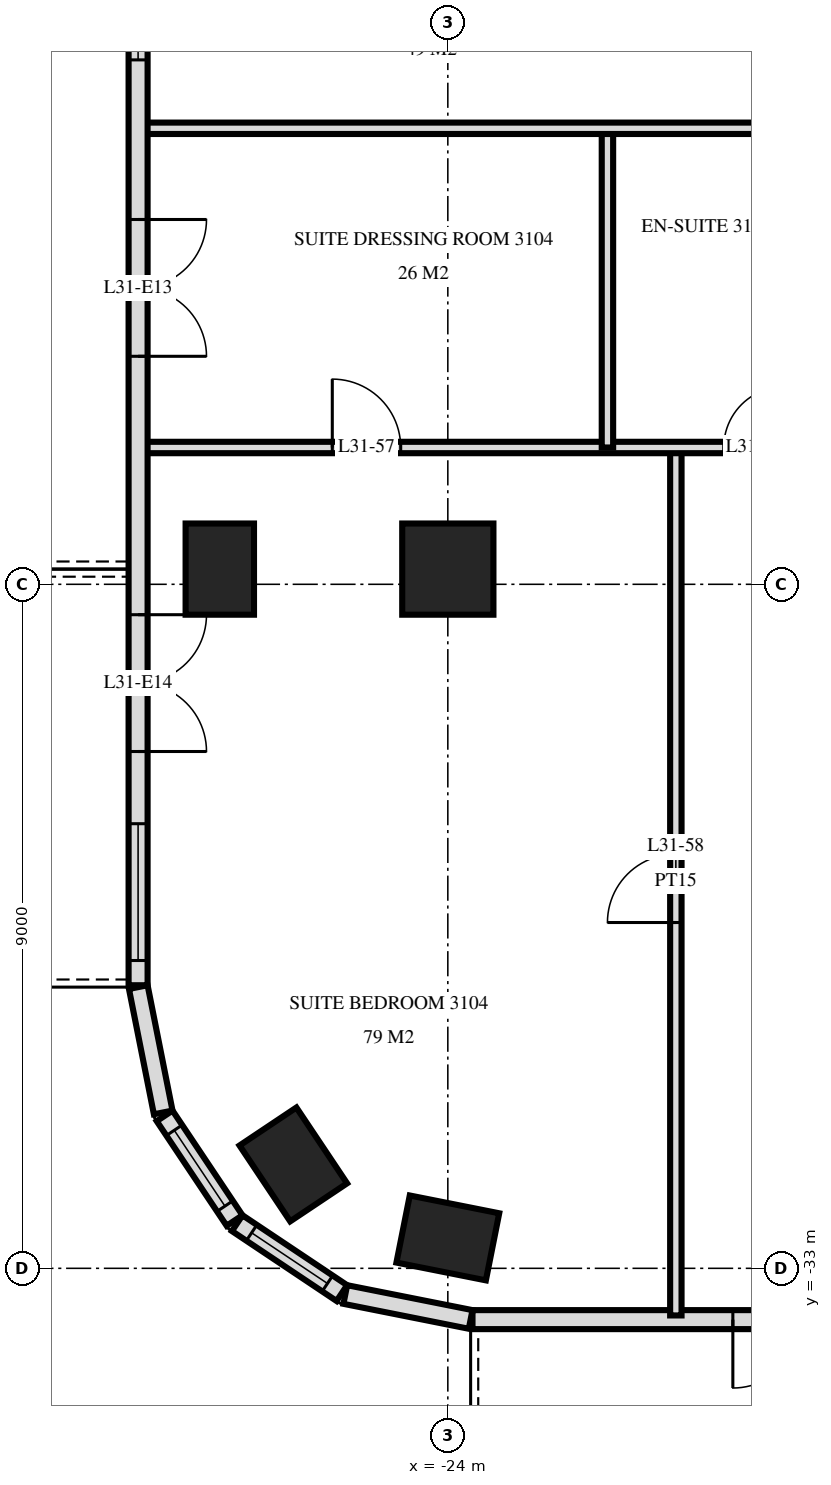
"""IFC4 building model, lengths in metres.
Left out: names, types, materials, properties, quantities, classifications, styles, units other than length and angle.
Written with IfcOpenShell. Run it as: python <this file> out.ifc"""

import sys

from ifc_helpers import new_model, si_unit, direction, frame, frame_2d, origin, origin_2d, place, context, subcontext, project, spatial, rectangle, extrude, element, fill, save


model = new_model("IFC4")
c1 = context("Model", 3, precision=1e-05, world=origin(), true_north=direction((0.0, 1.0)))
c2 = subcontext(c1, "Body", "Model", "MODEL_VIEW")
j1 = project(units=[si_unit("LENGTHUNIT", "METRE"), si_unit("PLANEANGLEUNIT", "RADIAN")], contexts=[c1])
p1 = place(None, origin())
s1 = spatial("IfcSite", under=j1, at=p1, CompositionType="ELEMENT")
p2 = place(p1, origin())
s2 = spatial("IfcBuilding", under=s1, at=p2, CompositionType="ELEMENT")
p3 = place(p2, frame((0.0, 0.0, 123.6)))
s3 = spatial("IfcBuildingStorey", under=s2, at=p3, CompositionType="ELEMENT", Elevation=123.6)
for number, where, z_axis, x_axis in (
    (1, (-27.0, -23.8, 0.0), (0.0, 0.0, 1.0), (0.0, 1.0, 0.0)),
    (2, (-26.033, -31.633, 0.0), (0.0, 0.0, 1.0), (-0.556, 0.831, 0.0)),
    (3, (-24.0, -32.6, 0.0), (0.0, 0.0, 1.0), (-0.981, 0.195, 0.0)),
):
    element("IfcColumn", number, at=place(p3, frame(where, z_axis=z_axis, x_axis=x_axis)), inside=s3, PredefinedType="COLUMN", context=c2, shape_type="SweptSolid", body=[
        extrude(rectangle(XDim=1.2, YDim=0.9, at=origin_2d()), origin(), (0.0, 0.0, 1.0), 3.6),
    ])
p4 = place(p3, frame((-24.0, -23.8, 0.0), z_axis=(0.0, 0.0, 1.0), x_axis=(1.0, 0.0, 0.0)))
e4 = element("IfcColumn", 4, at=p4, inside=s3, PredefinedType="COLUMN", context=c2, shape_type="SweptSolid", body=[
    extrude(rectangle(XDim=1.2, YDim=1.2, at=origin_2d()), origin(), (0.0, 0.0, 1.0), 3.6),
])
p5 = place(p3, frame((-28.075, -3.325, 0.0), z_axis=(0.0, 0.0, 1.0), x_axis=(0.0, -1.0, 0.0)))
e5 = element("IfcWall", 5, at=p5, inside=s3, PredefinedType="SOLIDWALL", context=c2, shape_type="SweptSolid", body=[
    extrude(rectangle(XDim=25.951, YDim=0.25, at=frame_2d((12.975, 0.0))), origin(), (0.0, 0.0, 1.0), 3.32),
])
p6 = place(p5, frame((6.575, 0.0, 0.0)))
e6 = element("IfcOpeningElement", 6, at=p6, cuts=e5, PredefinedType="OPENING", context=c2, shape_type="SweptSolid", body=[
    extrude(rectangle(XDim=1.8, YDim=2.4, at=frame_2d((0.9, 1.2))), frame((0.0, 0.135, 0.0), z_axis=(0.0, -1.0, 0.0), x_axis=(1.0, 0.0, 0.0)), (0.0, 0.0, 1.0), 0.27),
])
p7 = place(p5, frame((9.425, 0.0, 0.3)))
e7 = element("IfcOpeningElement", 7, at=p7, cuts=e5, PredefinedType="OPENING", context=c2, shape_type="SweptSolid", body=[
    extrude(rectangle(XDim=1.8, YDim=2.1, at=frame_2d((0.9, 1.05))), frame((0.0, 0.135, 0.0), z_axis=(0.0, -1.0, 0.0), x_axis=(1.0, 0.0, 0.0)), (0.0, 0.0, 1.0), 0.27),
])
p8 = place(p5, frame((12.575, 0.0, 0.3)))
e8 = element("IfcOpeningElement", 8, at=p8, cuts=e5, PredefinedType="OPENING", context=c2, shape_type="SweptSolid", body=[
    extrude(rectangle(XDim=1.2, YDim=2.1, at=frame_2d((0.6, 1.05))), frame((0.0, 0.135, 0.0), z_axis=(0.0, -1.0, 0.0), x_axis=(1.0, 0.0, 0.0)), (0.0, 0.0, 1.0), 0.27),
])
p9 = place(p5, frame((15.875, 0.0, 0.0)))
e9 = element("IfcOpeningElement", 9, at=p9, cuts=e5, PredefinedType="OPENING", context=c2, shape_type="SweptSolid", body=[
    extrude(rectangle(XDim=1.8, YDim=2.4, at=frame_2d((0.9, 1.2))), frame((0.0, 0.135, 0.0), z_axis=(0.0, -1.0, 0.0), x_axis=(1.0, 0.0, 0.0)), (0.0, 0.0, 1.0), 0.27),
])
p10 = place(p5, frame((21.075, 0.0, 0.0)))
e10 = element("IfcOpeningElement", 10, at=p10, cuts=e5, PredefinedType="OPENING", context=c2, shape_type="SweptSolid", body=[
    extrude(rectangle(XDim=1.8, YDim=2.4, at=frame_2d((0.9, 1.2))), frame((0.0, 0.135, 0.0), z_axis=(0.0, -1.0, 0.0), x_axis=(1.0, 0.0, 0.0)), (0.0, 0.0, 1.0), 0.27),
])
p11 = place(p5, frame((23.825, 0.0, 0.3)))
e11 = element("IfcOpeningElement", 11, at=p11, cuts=e5, PredefinedType="OPENING", context=c2, shape_type="SweptSolid", body=[
    extrude(rectangle(XDim=1.8, YDim=2.1, at=frame_2d((0.9, 1.05))), frame((0.0, 0.135, 0.0), z_axis=(0.0, -1.0, 0.0), x_axis=(1.0, 0.0, 0.0)), (0.0, 0.0, 1.0), 0.27),
])
p12 = place(p3, frame((-28.073, -29.3, 0.0), z_axis=(0.0, 0.0, 1.0), x_axis=(0.194999110559, -0.980803419081, 0.0)))
e12 = element("IfcWall", 12, at=p12, inside=s3, PredefinedType="SOLIDWALL", context=c2, shape_type="SweptSolid", body=[
    extrude(rectangle(XDim=1.681, YDim=0.25, at=frame_2d((0.841, 0.0))), origin(), (0.0, 0.0, 1.0), 3.32),
])
p13 = place(p3, frame((-27.726, -30.994, 0.0), z_axis=(0.0, 0.0, 1.0), x_axis=(0.55555029066, -0.831482937015, 0.0)))
e13 = element("IfcWall", 13, at=p13, inside=s3, PredefinedType="SOLIDWALL", context=c2, shape_type="SweptSolid", body=[
    extrude(rectangle(XDim=1.656, YDim=0.25, at=frame_2d((0.828, 0.0))), origin(), (0.0, 0.0, 1.0), 3.32),
])
p14 = place(p13, frame((0.228, 0.0, 0.9)))
e14 = element("IfcOpeningElement", 14, at=p14, cuts=e13, PredefinedType="OPENING", context=c2, shape_type="SweptSolid", body=[
    extrude(rectangle(XDim=1.2, YDim=1.5, at=frame_2d((0.6, 0.75))), frame((0.0, 0.135, 0.0), z_axis=(0.0, -1.0, 0.0), x_axis=(1.0, 0.0, 0.0)), (0.0, 0.0, 1.0), 0.27),
])
p15 = place(p3, frame((-26.771, -32.406, 0.0), z_axis=(0.0, 0.0, 1.0), x_axis=(0.831482937015, -0.55555029066, 0.0)))
e15 = element("IfcWall", 15, at=p15, inside=s3, PredefinedType="SOLIDWALL", context=c2, shape_type="SweptSolid", body=[
    extrude(rectangle(XDim=1.656, YDim=0.25, at=frame_2d((0.828, 0.0))), origin(), (0.0, 0.0, 1.0), 3.32),
])
p16 = place(p15, frame((0.228, 0.0, 0.9)))
e16 = element("IfcOpeningElement", 16, at=p16, cuts=e15, PredefinedType="OPENING", context=c2, shape_type="SweptSolid", body=[
    extrude(rectangle(XDim=1.2, YDim=1.5, at=frame_2d((0.6, 0.75))), frame((0.0, 0.135, 0.0), z_axis=(0.0, -1.0, 0.0), x_axis=(1.0, 0.0, 0.0)), (0.0, 0.0, 1.0), 0.27),
])
p17 = place(p3, frame((-25.349, -33.344, 0.0), z_axis=(0.0, 0.0, 1.0), x_axis=(0.980775640221, -0.19513878023, 0.0)))
e17 = element("IfcWall", 17, at=p17, inside=s3, PredefinedType="SOLIDWALL", context=c2, shape_type="SweptSolid", body=[
    extrude(rectangle(XDim=1.681, YDim=0.25, at=frame_2d((0.841, 0.0))), origin(), (0.0, 0.0, 1.0), 3.32),
])
p18 = place(p3, frame((-23.675, -33.675, 0.0), z_axis=(0.0, 0.0, 1.0), x_axis=(1.0, 0.0, 0.0)))
e18 = element("IfcWall", 18, at=p18, inside=s3, PredefinedType="SOLIDWALL", context=c2, shape_type="SweptSolid", body=[
    extrude(rectangle(XDim=47.351, YDim=0.25, at=frame_2d((23.675, 0.0))), origin(), (0.0, 0.0, 1.0), 3.32),
])
p19 = place(p18, frame((3.425, 0.0, 0.0)))
e19 = element("IfcOpeningElement", 19, at=p19, cuts=e18, PredefinedType="OPENING", context=c2, shape_type="SweptSolid", body=[
    extrude(rectangle(XDim=1.8, YDim=2.4, at=frame_2d((0.9, 1.2))), frame((0.0, 0.135, 0.0), z_axis=(0.0, -1.0, 0.0), x_axis=(1.0, 0.0, 0.0)), (0.0, 0.0, 1.0), 0.27),
])
p20 = place(p18, frame((6.275, 0.0, 0.0)))
e20 = element("IfcOpeningElement", 20, at=p20, cuts=e18, PredefinedType="OPENING", context=c2, shape_type="SweptSolid", body=[
    extrude(rectangle(XDim=1.8, YDim=2.4, at=frame_2d((0.9, 1.2))), frame((0.0, 0.135, 0.0), z_axis=(0.0, -1.0, 0.0), x_axis=(1.0, 0.0, 0.0)), (0.0, 0.0, 1.0), 0.27),
])
p21 = place(p18, frame((8.975, 0.0, 0.3)))
e21 = element("IfcOpeningElement", 21, at=p21, cuts=e18, PredefinedType="OPENING", context=c2, shape_type="SweptSolid", body=[
    extrude(rectangle(XDim=2.4, YDim=2.1, at=frame_2d((1.2, 1.05))), frame((0.0, 0.135, 0.0), z_axis=(0.0, -1.0, 0.0), x_axis=(1.0, 0.0, 0.0)), (0.0, 0.0, 1.0), 0.27),
])
p22 = place(p18, frame((12.275, 0.0, 0.0)))
e22 = element("IfcOpeningElement", 22, at=p22, cuts=e18, PredefinedType="OPENING", context=c2, shape_type="SweptSolid", body=[
    extrude(rectangle(XDim=1.8, YDim=2.4, at=frame_2d((0.9, 1.2))), frame((0.0, 0.135, 0.0), z_axis=(0.0, -1.0, 0.0), x_axis=(1.0, 0.0, 0.0)), (0.0, 0.0, 1.0), 0.27),
])
p23 = place(p18, frame((14.975, 0.0, 0.3)))
e23 = element("IfcOpeningElement", 23, at=p23, cuts=e18, PredefinedType="OPENING", context=c2, shape_type="SweptSolid", body=[
    extrude(rectangle(XDim=2.4, YDim=2.1, at=frame_2d((1.2, 1.05))), frame((0.0, 0.135, 0.0), z_axis=(0.0, -1.0, 0.0), x_axis=(1.0, 0.0, 0.0)), (0.0, 0.0, 1.0), 0.27),
])
p24 = place(p18, frame((17.975, 0.0, 0.3)))
e24 = element("IfcOpeningElement", 24, at=p24, cuts=e18, PredefinedType="OPENING", context=c2, shape_type="SweptSolid", body=[
    extrude(rectangle(XDim=2.4, YDim=2.1, at=frame_2d((1.2, 1.05))), frame((0.0, 0.135, 0.0), z_axis=(0.0, -1.0, 0.0), x_axis=(1.0, 0.0, 0.0)), (0.0, 0.0, 1.0), 0.27),
])
p25 = place(p18, frame((21.275, 0.0, 0.0)))
e25 = element("IfcOpeningElement", 25, at=p25, cuts=e18, PredefinedType="OPENING", context=c2, shape_type="SweptSolid", body=[
    extrude(rectangle(XDim=1.8, YDim=2.4, at=frame_2d((0.9, 1.2))), frame((0.0, 0.135, 0.0), z_axis=(0.0, -1.0, 0.0), x_axis=(1.0, 0.0, 0.0)), (0.0, 0.0, 1.0), 0.27),
])
p26 = place(p18, frame((24.275, 0.0, 0.0)))
e26 = element("IfcOpeningElement", 26, at=p26, cuts=e18, PredefinedType="OPENING", context=c2, shape_type="SweptSolid", body=[
    extrude(rectangle(XDim=1.8, YDim=2.4, at=frame_2d((0.9, 1.2))), frame((0.0, 0.135, 0.0), z_axis=(0.0, -1.0, 0.0), x_axis=(1.0, 0.0, 0.0)), (0.0, 0.0, 1.0), 0.27),
])
p27 = place(p18, frame((26.975, 0.0, 0.3)))
e27 = element("IfcOpeningElement", 27, at=p27, cuts=e18, PredefinedType="OPENING", context=c2, shape_type="SweptSolid", body=[
    extrude(rectangle(XDim=2.4, YDim=2.1, at=frame_2d((1.2, 1.05))), frame((0.0, 0.135, 0.0), z_axis=(0.0, -1.0, 0.0), x_axis=(1.0, 0.0, 0.0)), (0.0, 0.0, 1.0), 0.27),
])
p28 = place(p18, frame((30.275, 0.0, 0.0)))
e28 = element("IfcOpeningElement", 28, at=p28, cuts=e18, PredefinedType="OPENING", context=c2, shape_type="SweptSolid", body=[
    extrude(rectangle(XDim=1.8, YDim=2.4, at=frame_2d((0.9, 1.2))), frame((0.0, 0.135, 0.0), z_axis=(0.0, -1.0, 0.0), x_axis=(1.0, 0.0, 0.0)), (0.0, 0.0, 1.0), 0.27),
])
p29 = place(p18, frame((32.975, 0.0, 0.3)))
e29 = element("IfcOpeningElement", 29, at=p29, cuts=e18, PredefinedType="OPENING", context=c2, shape_type="SweptSolid", body=[
    extrude(rectangle(XDim=2.4, YDim=2.1, at=frame_2d((1.2, 1.05))), frame((0.0, 0.135, 0.0), z_axis=(0.0, -1.0, 0.0), x_axis=(1.0, 0.0, 0.0)), (0.0, 0.0, 1.0), 0.27),
])
p30 = place(p18, frame((36.275, 0.0, 0.0)))
e30 = element("IfcOpeningElement", 30, at=p30, cuts=e18, PredefinedType="OPENING", context=c2, shape_type="SweptSolid", body=[
    extrude(rectangle(XDim=1.8, YDim=2.4, at=frame_2d((0.9, 1.2))), frame((0.0, 0.135, 0.0), z_axis=(0.0, -1.0, 0.0), x_axis=(1.0, 0.0, 0.0)), (0.0, 0.0, 1.0), 0.27),
])
p31 = place(p18, frame((38.975, 0.0, 0.3)))
e31 = element("IfcOpeningElement", 31, at=p31, cuts=e18, PredefinedType="OPENING", context=c2, shape_type="SweptSolid", body=[
    extrude(rectangle(XDim=2.4, YDim=2.1, at=frame_2d((1.2, 1.05))), frame((0.0, 0.135, 0.0), z_axis=(0.0, -1.0, 0.0), x_axis=(1.0, 0.0, 0.0)), (0.0, 0.0, 1.0), 0.27),
])
p32 = place(p18, frame((41.975, 0.0, 0.3)))
e32 = element("IfcOpeningElement", 32, at=p32, cuts=e18, PredefinedType="OPENING", context=c2, shape_type="SweptSolid", body=[
    extrude(rectangle(XDim=2.4, YDim=2.1, at=frame_2d((1.2, 1.05))), frame((0.0, 0.135, 0.0), z_axis=(0.0, -1.0, 0.0), x_axis=(1.0, 0.0, 0.0)), (0.0, 0.0, 1.0), 0.27),
])
p33 = place(p18, frame((45.125, 0.0, 0.0)))
e33 = element("IfcOpeningElement", 33, at=p33, cuts=e18, PredefinedType="OPENING", context=c2, shape_type="SweptSolid", body=[
    extrude(rectangle(XDim=1.8, YDim=2.4, at=frame_2d((0.9, 1.2))), frame((0.0, 0.135, 0.0), z_axis=(0.0, -1.0, 0.0), x_axis=(1.0, 0.0, 0.0)), (0.0, 0.0, 1.0), 0.27),
])
p34 = place(p3, frame((-21.0, -33.62, 0.0), z_axis=(0.0, 0.0, 1.0), x_axis=(0.0, 1.0, 0.0)))
e34 = element("IfcWall", 34, at=p34, inside=s3, PredefinedType="PARTITIONING", context=c2, shape_type="SweptSolid", body=[
    extrude(rectangle(XDim=11.42, YDim=0.15, at=frame_2d((5.71, 0.0))), origin(), (0.0, 0.0, 1.0), 3.32),
])
p35 = place(p34, frame((5.17, 0.0, 0.0)))
e35 = element("IfcOpeningElement", 35, at=p35, cuts=e34, PredefinedType="OPENING", context=c2, shape_type="SweptSolid", body=[
    extrude(rectangle(XDim=0.9, YDim=2.1, at=frame_2d((0.45, 1.05))), frame((0.0, 0.085, 0.0), z_axis=(0.0, -1.0, 0.0), x_axis=(1.0, 0.0, 0.0)), (0.0, 0.0, 1.0), 0.17),
])
p36 = place(p3, frame((-21.9, -22.2, 0.0), z_axis=(0.0, 0.0, 1.0), x_axis=(0.0, 1.0, 0.0)))
e36 = element("IfcWall", 36, at=p36, inside=s3, PredefinedType="PARTITIONING", context=c2, shape_type="SweptSolid", body=[
    extrude(rectangle(XDim=4.2, YDim=0.15, at=frame_2d((2.1, 0.0))), origin(), (0.0, 0.0, 1.0), 3.32),
])
p37 = place(p3, frame((-28.02, -22.2, 0.0), z_axis=(0.0, 0.0, 1.0), x_axis=(1.0, 0.0, 0.0)))
e37 = element("IfcWall", 37, at=p37, inside=s3, PredefinedType="PARTITIONING", context=c2, shape_type="SweptSolid", body=[
    extrude(rectangle(XDim=9.12, YDim=0.15, at=frame_2d((4.56, 0.0))), origin(), (0.0, 0.0, 1.0), 3.32),
])
p38 = place(p37, frame((7.65, 0.0, 0.0)))
e38 = element("IfcOpeningElement", 38, at=p38, cuts=e37, PredefinedType="OPENING", context=c2, shape_type="SweptSolid", body=[
    extrude(rectangle(XDim=0.8, YDim=2.1, at=frame_2d((0.4, 1.05))), frame((0.0, 0.085, 0.0), z_axis=(0.0, -1.0, 0.0), x_axis=(1.0, 0.0, 0.0)), (0.0, 0.0, 1.0), 0.17),
])
p39 = place(p37, frame((2.5, 0.0, 0.0)))
e39 = element("IfcOpeningElement", 39, at=p39, cuts=e37, PredefinedType="OPENING", context=c2, shape_type="SweptSolid", body=[
    extrude(rectangle(XDim=0.9, YDim=2.1, at=frame_2d((0.45, 1.05))), frame((0.0, 0.085, 0.0), z_axis=(0.0, -1.0, 0.0), x_axis=(1.0, 0.0, 0.0)), (0.0, 0.0, 1.0), 0.17),
])
p40 = place(p3, frame((-28.02, -18.0, 0.0), z_axis=(0.0, 0.0, 1.0), x_axis=(1.0, 0.0, 0.0)))
e40 = element("IfcWall", 40, at=p40, inside=s3, PredefinedType="PARTITIONING", context=c2, shape_type="SweptSolid", body=[
    extrude(rectangle(XDim=56.04, YDim=0.15, at=frame_2d((28.02, 0.0))), origin(), (0.0, 0.0, 1.0), 3.32),
])
p41 = place(p40, frame((13.17, 0.0, 0.0)))
e41 = element("IfcOpeningElement", 41, at=p41, cuts=e40, PredefinedType="OPENING", context=c2, shape_type="SweptSolid", body=[
    extrude(rectangle(XDim=1.0, YDim=2.1, at=frame_2d((0.5, 1.05))), frame((0.0, 0.085, 0.0), z_axis=(0.0, -1.0, 0.0), x_axis=(1.0, 0.0, 0.0)), (0.0, 0.0, 1.0), 0.17),
])
p42 = place(p40, frame((11.32, 0.0, 0.0)))
e42 = element("IfcOpeningElement", 42, at=p42, cuts=e40, PredefinedType="OPENING", context=c2, shape_type="SweptSolid", body=[
    extrude(rectangle(XDim=1.0, YDim=2.1, at=frame_2d((0.5, 1.05))), frame((0.0, 0.085, 0.0), z_axis=(0.0, -1.0, 0.0), x_axis=(1.0, 0.0, 0.0)), (0.0, 0.0, 1.0), 0.17),
])
p43 = place(p40, frame((41.87, 0.0, 0.0)))
e43 = element("IfcOpeningElement", 43, at=p43, cuts=e40, PredefinedType="OPENING", context=c2, shape_type="SweptSolid", body=[
    extrude(rectangle(XDim=1.0, YDim=2.1, at=frame_2d((0.5, 1.05))), frame((0.0, 0.085, 0.0), z_axis=(0.0, -1.0, 0.0), x_axis=(1.0, 0.0, 0.0)), (0.0, 0.0, 1.0), 0.17),
])
p44 = place(p40, frame((43.17, 0.0, 0.0)))
e44 = element("IfcOpeningElement", 44, at=p44, cuts=e40, PredefinedType="OPENING", context=c2, shape_type="SweptSolid", body=[
    extrude(rectangle(XDim=1.0, YDim=2.1, at=frame_2d((0.5, 1.05))), frame((0.0, 0.085, 0.0), z_axis=(0.0, -1.0, 0.0), x_axis=(1.0, 0.0, 0.0)), (0.0, 0.0, 1.0), 0.17),
])
p45 = place(p40, frame((46.72, 0.0, 0.0)))
e45 = element("IfcOpeningElement", 45, at=p45, cuts=e40, PredefinedType="OPENING", context=c2, shape_type="SweptSolid", body=[
    extrude(rectangle(XDim=1.0, YDim=2.1, at=frame_2d((0.5, 1.05))), frame((0.0, 0.085, 0.0), z_axis=(0.0, -1.0, 0.0), x_axis=(1.0, 0.0, 0.0)), (0.0, 0.0, 1.0), 0.17),
])
p46 = place(p40, frame((21.52, 0.0, 0.0)))
e46 = element("IfcOpeningElement", 46, at=p46, cuts=e40, PredefinedType="OPENING", context=c2, shape_type="SweptSolid", body=[
    extrude(rectangle(XDim=1.0, YDim=2.1, at=frame_2d((0.5, 1.05))), frame((0.0, 0.085, 0.0), z_axis=(0.0, -1.0, 0.0), x_axis=(1.0, 0.0, 0.0)), (0.0, 0.0, 1.0), 0.17),
])
p47 = place(p40, frame((33.52, 0.0, 0.0)))
e47 = element("IfcOpeningElement", 47, at=p47, cuts=e40, PredefinedType="OPENING", context=c2, shape_type="SweptSolid", body=[
    extrude(rectangle(XDim=1.0, YDim=2.1, at=frame_2d((0.5, 1.05))), frame((0.0, 0.085, 0.0), z_axis=(0.0, -1.0, 0.0), x_axis=(1.0, 0.0, 0.0)), (0.0, 0.0, 1.0), 0.17),
])
p48 = place(p14, origin())
e48 = element("IfcWindow", 48, at=p48, inside=s3, PartitioningType="SINGLE_PANEL", PredefinedType="WINDOW", context=c2, shape_type="SweptSolid", body=[
    extrude(rectangle(XDim=1.2, YDim=1.5, at=frame_2d((0.6, 0.75))), frame((0.0, 0.03, 0.0), z_axis=(0.0, -1.0, 0.0), x_axis=(1.0, 0.0, 0.0)), (0.0, 0.0, 1.0), 0.06),
])
fill(e14, e48)
p49 = place(p16, origin())
e49 = element("IfcWindow", 49, at=p49, inside=s3, PartitioningType="SINGLE_PANEL", PredefinedType="WINDOW", context=c2, shape_type="SweptSolid", body=[
    extrude(rectangle(XDim=1.2, YDim=1.5, at=frame_2d((0.6, 0.75))), frame((0.0, 0.03, 0.0), z_axis=(0.0, -1.0, 0.0), x_axis=(1.0, 0.0, 0.0)), (0.0, 0.0, 1.0), 0.06),
])
fill(e16, e49)
p50 = place(p19, frame((0.9, 0.0, 0.0), z_axis=(0.0, 0.0, 1.0), x_axis=(-1.0, 0.0, 0.0)))
e50 = element("IfcDoor", 50, at=p50, inside=s3, OperationType="DOUBLE_DOOR_SINGLE_SWING", PredefinedType="DOOR", context=c2, shape_type="SweptSolid", body=[
    extrude(rectangle(XDim=1.8, YDim=2.4, at=frame_2d((0.0, 1.2))), frame((0.0, -0.025, 0.0), z_axis=(0.0, 1.0, 0.0), x_axis=(-1.0, 0.0, 0.0)), (0.0, 0.0, 1.0), 0.05),
])
fill(e19, e50)
p51 = place(p8, origin())
e51 = element("IfcWindow", 51, at=p51, inside=s3, PartitioningType="SINGLE_PANEL", PredefinedType="WINDOW", context=c2, shape_type="SweptSolid", body=[
    extrude(rectangle(XDim=1.2, YDim=2.1, at=frame_2d((0.6, 1.05))), frame((0.0, 0.03, 0.0), z_axis=(0.0, -1.0, 0.0), x_axis=(1.0, 0.0, 0.0)), (0.0, 0.0, 1.0), 0.06),
])
fill(e8, e51)
p52 = place(p9, origin())
e52 = element("IfcDoor", 52, at=p52, inside=s3, OperationType="DOUBLE_DOOR_SINGLE_SWING", PredefinedType="DOOR", context=c2, shape_type="SweptSolid", body=[
    extrude(rectangle(XDim=1.8, YDim=2.4, at=frame_2d((0.9, 1.2))), frame((0.0, 0.025, 0.0), z_axis=(0.0, -1.0, 0.0), x_axis=(1.0, 0.0, 0.0)), (0.0, 0.0, 1.0), 0.05),
])
fill(e9, e52)
p53 = place(p10, origin())
e53 = element("IfcDoor", 53, at=p53, inside=s3, OperationType="DOUBLE_DOOR_SINGLE_SWING", PredefinedType="DOOR", context=c2, shape_type="SweptSolid", body=[
    extrude(rectangle(XDim=1.8, YDim=2.4, at=frame_2d((0.9, 1.2))), frame((0.0, 0.025, 0.0), z_axis=(0.0, -1.0, 0.0), x_axis=(1.0, 0.0, 0.0)), (0.0, 0.0, 1.0), 0.05),
])
fill(e10, e53)
p54 = place(p11, origin())
e54 = element("IfcWindow", 54, at=p54, inside=s3, PartitioningType="SINGLE_PANEL", PredefinedType="WINDOW", context=c2, shape_type="SweptSolid", body=[
    extrude(rectangle(XDim=1.8, YDim=2.1, at=frame_2d((0.9, 1.05))), frame((0.0, 0.03, 0.0), z_axis=(0.0, -1.0, 0.0), x_axis=(1.0, 0.0, 0.0)), (0.0, 0.0, 1.0), 0.06),
])
fill(e11, e54)
p55 = place(p38, origin())
e55 = element("IfcDoor", 55, at=p55, inside=s3, OperationType="SINGLE_SWING_LEFT", PredefinedType="DOOR", context=c2, shape_type="SweptSolid", body=[
    extrude(rectangle(XDim=0.8, YDim=2.1, at=frame_2d((0.4, 1.05))), frame((0.0, 0.025, 0.0), z_axis=(0.0, -1.0, 0.0), x_axis=(1.0, 0.0, 0.0)), (0.0, 0.0, 1.0), 0.05),
])
fill(e38, e55)
p56 = place(p39, origin())
e56 = element("IfcDoor", 56, at=p56, inside=s3, OperationType="SINGLE_SWING_RIGHT", PredefinedType="DOOR", context=c2, shape_type="SweptSolid", body=[
    extrude(rectangle(XDim=0.9, YDim=2.1, at=frame_2d((0.45, 1.05))), frame((0.0, 0.025, 0.0), z_axis=(0.0, -1.0, 0.0), x_axis=(1.0, 0.0, 0.0)), (0.0, 0.0, 1.0), 0.05),
])
fill(e39, e56)
p57 = place(p35, origin())
e57 = element("IfcDoor", 57, at=p57, inside=s3, OperationType="SINGLE_SWING_RIGHT", PredefinedType="DOOR", context=c2, shape_type="SweptSolid", body=[
    extrude(rectangle(XDim=0.9, YDim=2.1, at=frame_2d((0.45, 1.05))), frame((0.0, 0.025, 0.0), z_axis=(0.0, -1.0, 0.0), x_axis=(1.0, 0.0, 0.0)), (0.0, 0.0, 1.0), 0.05),
])
fill(e35, e57)
save(model, sys.argv[1])
